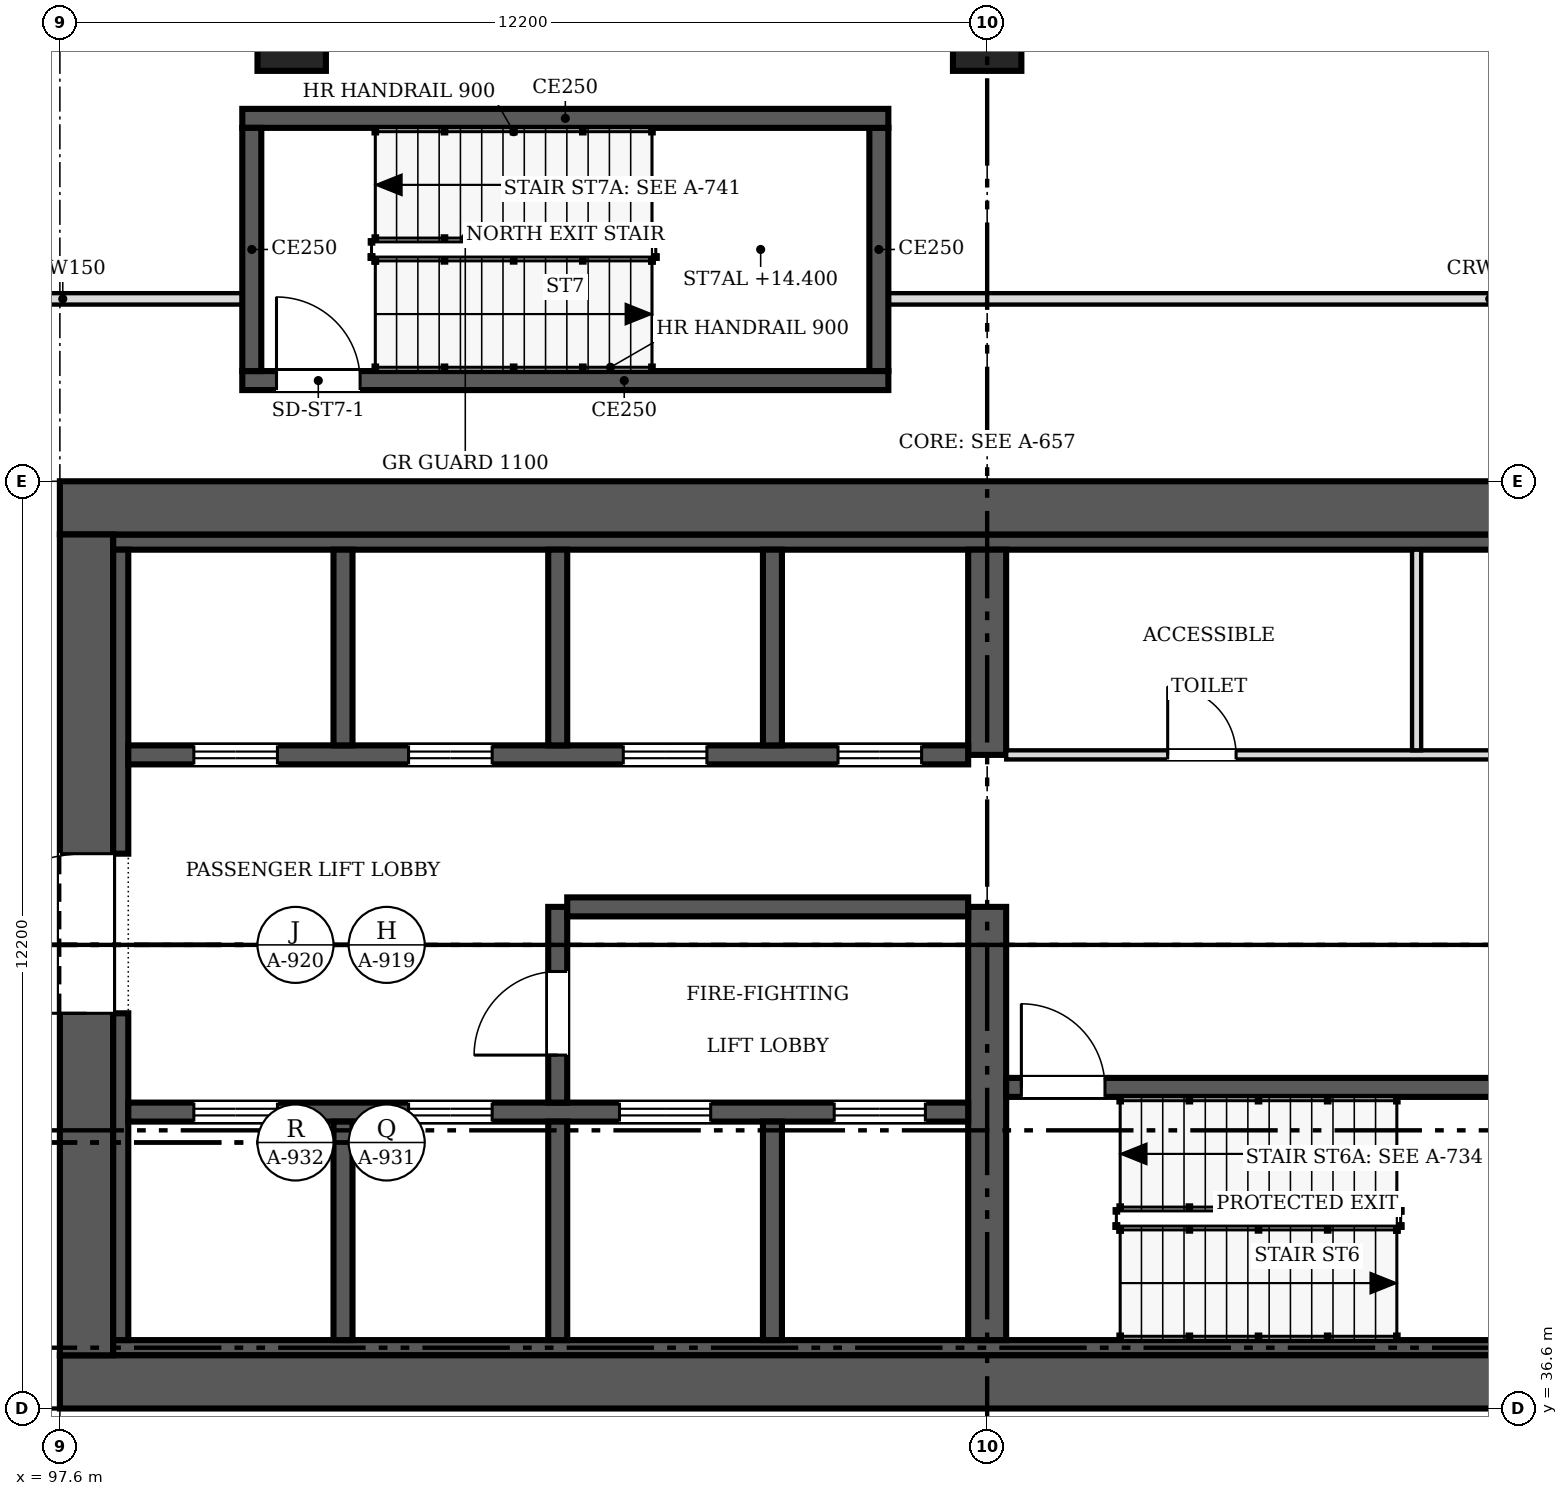
"""IFC4 building model, lengths in metres.
Left out: names, types, materials, properties, quantities, classifications, styles, units other than length and angle.
Written with IfcOpenShell. Run it as: python <this file> out.ifc"""

import sys

from ifc_helpers import new_model, si_unit, direction, frame, frame_2d, origin, origin_2d, place, context, subcontext, project, spatial, rectangle, extrude, source, transform, mapped, element, fill, save


model = new_model("IFC4")
c1 = context("Model", 3, precision=1e-05, world=origin(), true_north=direction((0.0, 1.0)))
c2 = subcontext(c1, "Body", "Model", "MODEL_VIEW")
j1 = project(units=[si_unit("LENGTHUNIT", "METRE"), si_unit("PLANEANGLEUNIT", "RADIAN")], contexts=[c1])
p1 = place(None, origin())
s1 = spatial("IfcSite", under=j1, at=p1, CompositionType="ELEMENT")
p2 = place(p1, origin())
s2 = spatial("IfcBuilding", under=s1, at=p2, CompositionType="ELEMENT")
p3 = place(p2, frame((0.0, 0.0, 12.0)))
s3 = spatial("IfcBuildingStorey", under=s2, at=p3, CompositionType="ELEMENT", Elevation=12.0)
for number, where, z_axis, x_axis in (
    (1, (109.8, 54.65, 0.0), (0.0, 0.0, 1.0), (1.0, 0.0, 0.0)),
    (2, (100.65, 54.65, 0.0), (0.0, 0.0, 1.0), (1.0, 0.0, 0.0)),
):
    element("IfcColumn", number, at=place(p3, frame(where, z_axis=z_axis, x_axis=x_axis)), inside=s3, PredefinedType="COLUMN", context=c2, shape_type="SweptSolid", body=[
        extrude(rectangle(XDim=0.9, YDim=0.9, at=origin_2d()), origin(), (0.0, 0.0, 1.0), 4.6),
    ])
p4 = place(p3, frame((122.0, 36.95, 0.0), z_axis=(0.0, 0.0, 1.0), x_axis=(-1.0, 0.0, 0.0)))
e3 = element("IfcWall", 3, at=p4, inside=s3, PredefinedType="SHEAR", context=c2, shape_type="SweptSolid", body=[
    extrude(rectangle(XDim=24.4, YDim=0.7, at=frame_2d((12.2, 0.0))), origin(), (0.0, 0.0, 1.0), 4.8),
])
p5 = place(p3, frame((97.95, 37.3, 0.0), z_axis=(0.0, 0.0, 1.0), x_axis=(0.0, 1.0, 0.0)))
e4 = element("IfcWall", 4, at=p5, inside=s3, PredefinedType="SHEAR", context=c2, shape_type="SweptSolid", body=[
    extrude(rectangle(XDim=10.8, YDim=0.7, at=frame_2d((5.4, 0.0))), origin(), (0.0, 0.0, 1.0), 4.8),
])
m1 = source(origin(), c2, "Body", "SweptSolid", [
    extrude(rectangle(XDim=2.1, YDim=2.4, at=frame_2d((1.05, 1.2))), frame((0.0, 0.36, 0.0), z_axis=(0.0, -1.0, 0.0), x_axis=(1.0, 0.0, 0.0)), (0.0, 0.0, 1.0), 0.72),
])
p6 = place(p5, frame((4.5, 0.0, 0.0)))
e5 = element("IfcOpeningElement", 5, at=p6, cuts=e4, PredefinedType="OPENING", context=c2, shape_type="MappedRepresentation", body=[
    mapped(m1, transform((0.0, 0.0, 0.0), scale=1.0)),
])
p7 = place(p3, frame((97.6, 48.45, 0.0), z_axis=(0.0, 0.0, 1.0), x_axis=(1.0, 0.0, 0.0)))
e6 = element("IfcWall", 6, at=p7, inside=s3, PredefinedType="SHEAR", context=c2, shape_type="SweptSolid", body=[
    extrude(rectangle(XDim=24.4, YDim=0.7, at=frame_2d((12.2, 0.0))), origin(), (0.0, 0.0, 1.0), 4.8),
])
for number, where, z_axis, x_axis in (
    (7, (98.3, 37.4, 0.0), (0.0, 0.0, 1.0), (1.0, 0.0, 0.0)),
    (8, (98.3, 48.0, 0.0), (0.0, 0.0, 1.0), (1.0, 0.0, 0.0)),
):
    element("IfcWall", number, at=place(p3, frame(where, z_axis=z_axis, x_axis=x_axis)), inside=s3, PredefinedType="SOLIDWALL", context=c2, shape_type="SweptSolid", body=[
        extrude(rectangle(XDim=23.0, YDim=0.2, at=frame_2d((11.5, 0.0))), origin(), (0.0, 0.0, 1.0), 4.8),
    ])
p8 = place(p3, frame((98.4, 37.5, 0.0), z_axis=(0.0, 0.0, 1.0), x_axis=(0.0, 1.0, 0.0)))
e9 = element("IfcWall", 9, at=p8, inside=s3, PredefinedType="SOLIDWALL", context=c2, shape_type="SweptSolid", body=[
    extrude(rectangle(XDim=4.3, YDim=0.2, at=frame_2d((2.15, 0.0))), origin(), (0.0, 0.0, 1.0), 4.8),
])
p9 = place(p3, frame((98.4, 43.9, 0.0), z_axis=(0.0, 0.0, 1.0), x_axis=(0.0, 1.0, 0.0)))
e10 = element("IfcWall", 10, at=p9, inside=s3, PredefinedType="SOLIDWALL", context=c2, shape_type="SweptSolid", body=[
    extrude(rectangle(XDim=4.0, YDim=0.2, at=frame_2d((2.0, 0.0))), origin(), (0.0, 0.0, 1.0), 4.8),
])
p10 = place(p3, frame((109.8, 37.5, 0.0), z_axis=(0.0, 0.0, 1.0), x_axis=(0.0, 1.0, 0.0)))
e11 = element("IfcWall", 11, at=p10, inside=s3, PredefinedType="SHEAR", context=c2, shape_type="SweptSolid", body=[
    extrude(rectangle(XDim=5.7, YDim=0.5, at=frame_2d((2.85, 0.0))), origin(), (0.0, 0.0, 1.0), 4.8),
])
p11 = place(p3, frame((109.8, 45.2, 0.0), z_axis=(0.0, 0.0, 1.0), x_axis=(0.0, 1.0, 0.0)))
e12 = element("IfcWall", 12, at=p11, inside=s3, PredefinedType="SHEAR", context=c2, shape_type="SweptSolid", body=[
    extrude(rectangle(XDim=2.7, YDim=0.5, at=frame_2d((1.35, 0.0))), origin(), (0.0, 0.0, 1.0), 4.8),
])
p12 = place(p3, frame((98.5, 40.5, 0.0), z_axis=(0.0, 0.0, 1.0), x_axis=(1.0, 0.0, 0.0)))
e13 = element("IfcWall", 13, at=p12, inside=s3, PredefinedType="SOLIDWALL", context=c2, shape_type="SweptSolid", body=[
    extrude(rectangle(XDim=11.05, YDim=0.25, at=frame_2d((5.525, 0.0))), origin(), (0.0, 0.0, 1.0), 4.8),
])
m2 = source(origin(), c2, "Body", "SweptSolid", [
    extrude(rectangle(XDim=1.1, YDim=2.1, at=frame_2d((0.55, 1.05))), frame((0.0, 0.135, 0.0), z_axis=(0.0, -1.0, 0.0), x_axis=(1.0, 0.0, 0.0)), (0.0, 0.0, 1.0), 0.27),
])
p13 = place(p12, frame((0.863, 0.0, 0.0)))
e14 = element("IfcOpeningElement", 14, at=p13, cuts=e13, PredefinedType="OPENING", context=c2, shape_type="MappedRepresentation", body=[
    mapped(m2, transform((0.0, 0.0, 0.0), scale=1.0)),
])
p14 = place(p12, frame((3.688, 0.0, 0.0)))
e15 = element("IfcOpeningElement", 15, at=p14, cuts=e13, PredefinedType="OPENING", context=c2, shape_type="MappedRepresentation", body=[
    mapped(m2, transform((0.0, 0.0, 0.0), scale=1.0)),
])
m3 = source(origin(), c2, "Body", "SweptSolid", [
    extrude(rectangle(XDim=1.2, YDim=2.1, at=frame_2d((0.6, 1.05))), frame((0.0, 0.135, 0.0), z_axis=(0.0, -1.0, 0.0), x_axis=(1.0, 0.0, 0.0)), (0.0, 0.0, 1.0), 0.27),
])
p15 = place(p12, frame((6.462, 0.0, 0.0)))
e16 = element("IfcOpeningElement", 16, at=p15, cuts=e13, PredefinedType="OPENING", context=c2, shape_type="MappedRepresentation", body=[
    mapped(m3, transform((0.0, 0.0, 0.0), scale=1.0)),
])
p16 = place(p12, frame((9.288, 0.0, 0.0)))
e17 = element("IfcOpeningElement", 17, at=p16, cuts=e13, PredefinedType="OPENING", context=c2, shape_type="MappedRepresentation", body=[
    mapped(m3, transform((0.0, 0.0, 0.0), scale=1.0)),
])
p17 = place(p3, frame((109.55, 45.2, 0.0), z_axis=(0.0, 0.0, 1.0), x_axis=(-1.0, 0.0, 0.0)))
e18 = element("IfcWall", 18, at=p17, inside=s3, PredefinedType="SOLIDWALL", context=c2, shape_type="SweptSolid", body=[
    extrude(rectangle(XDim=11.05, YDim=0.25, at=frame_2d((5.525, 0.0))), origin(), (0.0, 0.0, 1.0), 4.8),
])
p18 = place(p17, frame((9.087, 0.0, 0.0)))
e19 = element("IfcOpeningElement", 19, at=p18, cuts=e18, PredefinedType="OPENING", context=c2, shape_type="MappedRepresentation", body=[
    mapped(m2, transform((0.0, 0.0, 0.0), scale=1.0)),
])
p19 = place(p17, frame((6.262, 0.0, 0.0)))
e20 = element("IfcOpeningElement", 20, at=p19, cuts=e18, PredefinedType="OPENING", context=c2, shape_type="MappedRepresentation", body=[
    mapped(m2, transform((0.0, 0.0, 0.0), scale=1.0)),
])
p20 = place(p17, frame((3.438, 0.0, 0.0)))
e21 = element("IfcOpeningElement", 21, at=p20, cuts=e18, PredefinedType="OPENING", context=c2, shape_type="MappedRepresentation", body=[
    mapped(m2, transform((0.0, 0.0, 0.0), scale=1.0)),
])
p21 = place(p17, frame((0.613, 0.0, 0.0)))
e22 = element("IfcOpeningElement", 22, at=p21, cuts=e18, PredefinedType="OPENING", context=c2, shape_type="MappedRepresentation", body=[
    mapped(m2, transform((0.0, 0.0, 0.0), scale=1.0)),
])
p22 = place(p3, frame((118.1, 40.825, 0.0), z_axis=(0.0, 0.0, 1.0), x_axis=(-1.0, 0.0, 0.0)))
e23 = element("IfcWall", 23, at=p22, inside=s3, PredefinedType="SOLIDWALL", context=c2, shape_type="SweptSolid", body=[
    extrude(rectangle(XDim=8.05, YDim=0.25, at=frame_2d((4.025, 0.0))), origin(), (0.0, 0.0, 1.0), 4.8),
])
p23 = place(p22, frame((6.75, 0.0, 0.0)))
e24 = element("IfcOpeningElement", 24, at=p23, cuts=e23, PredefinedType="OPENING", context=c2, shape_type="MappedRepresentation", body=[
    mapped(m2, transform((0.0, 0.0, 0.0), scale=1.0)),
])
p24 = place(p3, frame((104.15, 37.5, 0.0), z_axis=(0.0, 0.0, 1.0), x_axis=(0.0, 1.0, 0.0)))
e25 = element("IfcWall", 25, at=p24, inside=s3, PredefinedType="SOLIDWALL", context=c2, shape_type="SweptSolid", body=[
    extrude(rectangle(XDim=2.875, YDim=0.25, at=frame_2d((1.438, 0.0))), origin(), (0.0, 0.0, 1.0), 4.8),
])
p25 = place(p3, frame((104.15, 43.2, 0.0), z_axis=(0.0, 0.0, 1.0), x_axis=(0.0, -1.0, 0.0)))
e26 = element("IfcWall", 26, at=p25, inside=s3, PredefinedType="SOLIDWALL", context=c2, shape_type="SweptSolid", body=[
    extrude(rectangle(XDim=2.575, YDim=0.25, at=frame_2d((1.288, 0.0))), origin(), (0.0, 0.0, 1.0), 4.8),
])
p26 = place(p25, frame((0.85, 0.0, 0.0)))
e27 = element("IfcOpeningElement", 27, at=p26, cuts=e26, PredefinedType="OPENING", context=c2, shape_type="MappedRepresentation", body=[
    mapped(m2, transform((0.0, 0.0, 0.0), scale=1.0)),
])
p27 = place(p3, frame((104.275, 43.2, 0.0), z_axis=(0.0, 0.0, 1.0), x_axis=(1.0, 0.0, 0.0)))
e28 = element("IfcWall", 28, at=p27, inside=s3, PredefinedType="SOLIDWALL", context=c2, shape_type="SweptSolid", body=[
    extrude(rectangle(XDim=5.275, YDim=0.25, at=frame_2d((2.638, 0.0))), origin(), (0.0, 0.0, 1.0), 4.8),
])
for number, where, z_axis, x_axis in (
    (29, (101.325, 37.5, 0.0), (0.0, 0.0, 1.0), (0.0, 1.0, 0.0)),
    (30, (106.975, 37.5, 0.0), (0.0, 0.0, 1.0), (0.0, 1.0, 0.0)),
):
    element("IfcWall", number, at=place(p3, frame(where, z_axis=z_axis, x_axis=x_axis)), inside=s3, PredefinedType="SOLIDWALL", context=c2, shape_type="SweptSolid", body=[
        extrude(rectangle(XDim=2.875, YDim=0.25, at=frame_2d((1.438, 0.0))), origin(), (0.0, 0.0, 1.0), 4.8),
    ])
for number, where, z_axis, x_axis in (
    (31, (101.325, 45.325, 0.0), (0.0, 0.0, 1.0), (0.0, 1.0, 0.0)),
    (32, (104.15, 45.325, 0.0), (0.0, 0.0, 1.0), (0.0, 1.0, 0.0)),
    (33, (106.975, 45.325, 0.0), (0.0, 0.0, 1.0), (0.0, 1.0, 0.0)),
):
    element("IfcWall", number, at=place(p3, frame(where, z_axis=z_axis, x_axis=x_axis)), inside=s3, PredefinedType="SOLIDWALL", context=c2, shape_type="SweptSolid", body=[
        extrude(rectangle(XDim=2.575, YDim=0.25, at=frame_2d((1.288, 0.0))), origin(), (0.0, 0.0, 1.0), 4.8),
    ])
p28 = place(p3, frame((110.05, 45.2, 0.0), z_axis=(0.0, 0.0, 1.0), x_axis=(1.0, 0.0, 0.0)))
e34 = element("IfcWall", 34, at=p28, inside=s3, PredefinedType="PARTITIONING", context=c2, shape_type="SweptSolid", body=[
    extrude(rectangle(XDim=11.05, YDim=0.12, at=frame_2d((5.525, 0.0))), origin(), (0.0, 0.0, 1.0), 4.6),
])
m4 = source(origin(), c2, "Body", "SweptSolid", [
    extrude(rectangle(XDim=0.9, YDim=2.1, at=frame_2d((0.45, 1.05))), frame((0.0, 0.07, 0.0), z_axis=(0.0, -1.0, 0.0), x_axis=(1.0, 0.0, 0.0)), (0.0, 0.0, 1.0), 0.14),
])
p29 = place(p28, frame((2.125, 0.0, 0.0)))
e35 = element("IfcOpeningElement", 35, at=p29, cuts=e34, PredefinedType="OPENING", context=c2, shape_type="MappedRepresentation", body=[
    mapped(m4, transform((0.0, 0.0, 0.0), scale=1.0)),
])
p30 = place(p28, frame((7.775, 0.0, 0.0)))
e36 = element("IfcOpeningElement", 36, at=p30, cuts=e34, PredefinedType="OPENING", context=c2, shape_type="MappedRepresentation", body=[
    mapped(m4, transform((0.0, 0.0, 0.0), scale=1.0)),
])
p31 = place(p3, frame((115.45, 45.26, 0.0), z_axis=(0.0, 0.0, 1.0), x_axis=(0.0, 1.0, 0.0)))
e37 = element("IfcWall", 37, at=p31, inside=s3, PredefinedType="PARTITIONING", context=c2, shape_type="SweptSolid", body=[
    extrude(rectangle(XDim=2.64, YDim=0.12, at=frame_2d((1.32, 0.0))), origin(), (0.0, 0.0, 1.0), 4.6),
])
p32 = place(p3, frame((108.5, 50.125, 0.0), z_axis=(0.0, 0.0, 1.0), x_axis=(-1.0, 0.0, 0.0)))
e38 = element("IfcWall", 38, at=p32, inside=s3, PredefinedType="SOLIDWALL", context=c2, shape_type="SweptSolid", body=[
    extrude(rectangle(XDim=8.5, YDim=0.25, at=frame_2d((4.25, 0.0))), origin(), (0.0, 0.0, 1.0), 4.8),
])
p33 = place(p32, frame((6.95, 0.0, 0.0)))
e39 = element("IfcOpeningElement", 39, at=p33, cuts=e38, PredefinedType="OPENING", context=c2, shape_type="MappedRepresentation", body=[
    mapped(m2, transform((0.0, 0.0, 0.0), scale=1.0)),
])
p34 = place(p3, frame((100.125, 50.25, 0.0), z_axis=(0.0, 0.0, 1.0), x_axis=(0.0, 1.0, 0.0)))
e40 = element("IfcWall", 40, at=p34, inside=s3, PredefinedType="SOLIDWALL", context=c2, shape_type="SweptSolid", body=[
    extrude(rectangle(XDim=3.2, YDim=0.25, at=frame_2d((1.6, 0.0))), origin(), (0.0, 0.0, 1.0), 4.8),
])
p35 = place(p3, frame((100.0, 53.575, 0.0), z_axis=(0.0, 0.0, 1.0), x_axis=(1.0, 0.0, 0.0)))
e41 = element("IfcWall", 41, at=p35, inside=s3, PredefinedType="SOLIDWALL", context=c2, shape_type="SweptSolid", body=[
    extrude(rectangle(XDim=8.5, YDim=0.25, at=frame_2d((4.25, 0.0))), origin(), (0.0, 0.0, 1.0), 4.8),
])
p36 = place(p3, frame((108.375, 53.45, 0.0), z_axis=(0.0, 0.0, 1.0), x_axis=(0.0, -1.0, 0.0)))
e42 = element("IfcWall", 42, at=p36, inside=s3, PredefinedType="SOLIDWALL", context=c2, shape_type="SweptSolid", body=[
    extrude(rectangle(XDim=3.2, YDim=0.25, at=frame_2d((1.6, 0.0))), origin(), (0.0, 0.0, 1.0), 4.8),
])
p37 = place(p3, frame((95.276, 51.2, 0.0), z_axis=(0.0, 0.0, 1.0), x_axis=(1.0, 0.0, 0.0)))
e43 = element("IfcWall", 43, at=p37, inside=s3, PredefinedType="PARTITIONING", context=c2, shape_type="SweptSolid", body=[
    extrude(rectangle(XDim=4.724, YDim=0.15, at=frame_2d((2.362, 0.0))), origin(), (0.0, 0.0, 1.0), 3.672),
])
p38 = place(p3, frame((108.5, 51.2, 0.0), z_axis=(0.0, 0.0, 1.0), x_axis=(1.0, 0.0, 0.0)))
e44 = element("IfcWall", 44, at=p38, inside=s3, PredefinedType="PARTITIONING", context=c2, shape_type="SweptSolid", body=[
    extrude(rectangle(XDim=15.824, YDim=0.15, at=frame_2d((7.912, 0.0))), origin(), (0.0, 0.0, 1.0), 3.672),
])
m5 = source(origin(), c2, "Body", "SweptSolid", [
    extrude(rectangle(XDim=2.1, YDim=2.4, at=frame_2d((1.05, 1.2))), frame((0.0, 0.025, 0.0), z_axis=(0.0, -1.0, 0.0), x_axis=(1.0, 0.0, 0.0)), (0.0, 0.0, 1.0), 0.05),
])
p39 = place(p6, origin())
e45 = element("IfcDoor", 45, at=p39, inside=s3, OperationType="DOUBLE_DOOR_SINGLE_SWING", PredefinedType="DOOR", context=c2, shape_type="MappedRepresentation", body=[
    mapped(m5, transform((0.0, 0.0, 0.0), scale=1.0)),
])
fill(e5, e45)
m6 = source(origin(), c2, "Body", "SweptSolid", [
    extrude(rectangle(XDim=1.1, YDim=2.1, at=frame_2d((0.55, 1.05))), frame((0.0, 0.025, 0.0), z_axis=(0.0, -1.0, 0.0), x_axis=(1.0, 0.0, 0.0)), (0.0, 0.0, 1.0), 0.05),
])
p40 = place(p13, origin())
e46 = element("IfcDoor", 46, at=p40, inside=s3, OperationType="DOUBLE_DOOR_SLIDING", PredefinedType="DOOR", context=c2, shape_type="MappedRepresentation", body=[
    mapped(m6, transform((0.0, 0.0, 0.0), scale=1.0)),
])
fill(e14, e46)
p41 = place(p14, origin())
e47 = element("IfcDoor", 47, at=p41, inside=s3, OperationType="DOUBLE_DOOR_SLIDING", PredefinedType="DOOR", context=c2, shape_type="MappedRepresentation", body=[
    mapped(m6, transform((0.0, 0.0, 0.0), scale=1.0)),
])
fill(e15, e47)
m7 = source(origin(), c2, "Body", "SweptSolid", [
    extrude(rectangle(XDim=1.2, YDim=2.1, at=frame_2d((0.6, 1.05))), frame((0.0, 0.025, 0.0), z_axis=(0.0, -1.0, 0.0), x_axis=(1.0, 0.0, 0.0)), (0.0, 0.0, 1.0), 0.05),
])
p42 = place(p15, origin())
e48 = element("IfcDoor", 48, at=p42, inside=s3, OperationType="DOUBLE_DOOR_SLIDING", PredefinedType="DOOR", context=c2, shape_type="MappedRepresentation", body=[
    mapped(m7, transform((0.0, 0.0, 0.0), scale=1.0)),
])
fill(e16, e48)
p43 = place(p16, origin())
e49 = element("IfcDoor", 49, at=p43, inside=s3, OperationType="DOUBLE_DOOR_SLIDING", PredefinedType="DOOR", context=c2, shape_type="MappedRepresentation", body=[
    mapped(m7, transform((0.0, 0.0, 0.0), scale=1.0)),
])
fill(e17, e49)
p44 = place(p18, origin())
e50 = element("IfcDoor", 50, at=p44, inside=s3, OperationType="DOUBLE_DOOR_SLIDING", PredefinedType="DOOR", context=c2, shape_type="MappedRepresentation", body=[
    mapped(m6, transform((0.0, 0.0, 0.0), scale=1.0)),
])
fill(e19, e50)
p45 = place(p19, origin())
e51 = element("IfcDoor", 51, at=p45, inside=s3, OperationType="DOUBLE_DOOR_SLIDING", PredefinedType="DOOR", context=c2, shape_type="MappedRepresentation", body=[
    mapped(m6, transform((0.0, 0.0, 0.0), scale=1.0)),
])
fill(e20, e51)
p46 = place(p20, origin())
e52 = element("IfcDoor", 52, at=p46, inside=s3, OperationType="DOUBLE_DOOR_SLIDING", PredefinedType="DOOR", context=c2, shape_type="MappedRepresentation", body=[
    mapped(m6, transform((0.0, 0.0, 0.0), scale=1.0)),
])
fill(e21, e52)
p47 = place(p21, origin())
e53 = element("IfcDoor", 53, at=p47, inside=s3, OperationType="DOUBLE_DOOR_SLIDING", PredefinedType="DOOR", context=c2, shape_type="MappedRepresentation", body=[
    mapped(m6, transform((0.0, 0.0, 0.0), scale=1.0)),
])
fill(e22, e53)
p48 = place(p23, origin())
e54 = element("IfcDoor", 54, at=p48, inside=s3, OperationType="SINGLE_SWING_RIGHT", PredefinedType="DOOR", context=c2, shape_type="MappedRepresentation", body=[
    mapped(m6, transform((0.0, 0.0, 0.0), scale=1.0)),
])
fill(e24, e54)
p49 = place(p26, origin())
e55 = element("IfcDoor", 55, at=p49, inside=s3, OperationType="SINGLE_SWING_RIGHT", PredefinedType="DOOR", context=c2, shape_type="MappedRepresentation", body=[
    mapped(m6, transform((0.0, 0.0, 0.0), scale=1.0)),
])
fill(e27, e55)
m8 = source(origin(), c2, "Body", "SweptSolid", [
    extrude(rectangle(XDim=0.9, YDim=2.1, at=frame_2d((0.45, 1.05))), frame((0.0, 0.025, 0.0), z_axis=(0.0, -1.0, 0.0), x_axis=(1.0, 0.0, 0.0)), (0.0, 0.0, 1.0), 0.05),
])
p50 = place(p29, origin())
e56 = element("IfcDoor", 56, at=p50, inside=s3, OperationType="SINGLE_SWING_LEFT", PredefinedType="DOOR", context=c2, shape_type="MappedRepresentation", body=[
    mapped(m8, transform((0.0, 0.0, 0.0), scale=1.0)),
])
fill(e35, e56)
p51 = place(p33, origin())
e57 = element("IfcDoor", 57, at=p51, inside=s3, OperationType="SINGLE_SWING_RIGHT", PredefinedType="DOOR", context=c2, shape_type="MappedRepresentation", body=[
    mapped(m6, transform((0.0, 0.0, 0.0), scale=1.0)),
])
fill(e39, e57)
save(model, sys.argv[1])
